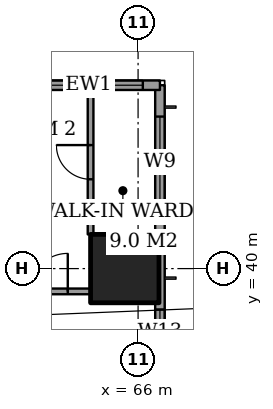
"""IFC4 building model, lengths in metres.
Left out: names, types, materials, properties, quantities, classifications, styles, units other than length and angle.
Written with IfcOpenShell. Run it as: python <this file> out.ifc"""

import sys

from ifc_helpers import new_model, si_unit, direction, frame, frame_2d, origin, origin_2d, place, context, subcontext, project, spatial, rectangle, extrude, element, fill, save


model = new_model("IFC4")
c1 = context("Model", 3, precision=1e-05, world=origin(), true_north=direction((0.0, 1.0)))
c2 = subcontext(c1, "Body", "Model", "MODEL_VIEW")
j1 = project(units=[si_unit("LENGTHUNIT", "METRE"), si_unit("PLANEANGLEUNIT", "RADIAN")], contexts=[c1])
p1 = place(None, origin())
s1 = spatial("IfcSite", under=j1, at=p1, CompositionType="ELEMENT")
p2 = place(p1, origin())
s2 = spatial("IfcBuilding", under=s1, at=p2, CompositionType="ELEMENT")
p3 = place(p2, frame((0.0, 0.0, 193.0)))
s3 = spatial("IfcBuildingStorey", under=s2, at=p3, CompositionType="ELEMENT", Elevation=193.0)
p4 = place(p3, frame((65.65, 40.0, 0.0), z_axis=(0.0, 0.0, 1.0), x_axis=(1.0, 0.0, 0.0)))
e1 = element("IfcColumn", 1, at=p4, inside=s3, PredefinedType="COLUMN", context=c2, shape_type="SweptSolid", body=[
    extrude(rectangle(XDim=1.8, YDim=1.8, at=origin_2d()), origin(), (0.0, 0.0, 1.0), 3.6),
])
p5 = place(p3, frame((66.575, 3.175, 0.0), z_axis=(0.0, 0.0, 1.0), x_axis=(0.0, 1.0, 0.0)))
e2 = element("IfcWall", 2, at=p5, inside=s3, PredefinedType="SOLIDWALL", context=c2, shape_type="SweptSolid", body=[
    extrude(rectangle(XDim=41.65, YDim=0.25, at=frame_2d((20.825, 0.0))), origin(), (0.0, 0.0, 1.0), 3.6),
])
p6 = place(p5, frame((0.825, 0.0, 0.2)))
e3 = element("IfcOpeningElement", 3, at=p6, cuts=e2, PredefinedType="OPENING", context=c2, shape_type="SweptSolid", body=[
    extrude(rectangle(XDim=2.4, YDim=2.4, at=frame_2d((1.2, 1.2))), frame((0.0, 0.135, 0.0), z_axis=(0.0, -1.0, 0.0), x_axis=(1.0, 0.0, 0.0)), (0.0, 0.0, 1.0), 0.27),
])
p7 = place(p5, frame((6.05, 0.0, 0.2)))
e4 = element("IfcOpeningElement", 4, at=p7, cuts=e2, PredefinedType="OPENING", context=c2, shape_type="SweptSolid", body=[
    extrude(rectangle(XDim=1.2, YDim=2.4, at=frame_2d((0.6, 1.2))), frame((0.0, 0.135, 0.0), z_axis=(0.0, -1.0, 0.0), x_axis=(1.0, 0.0, 0.0)), (0.0, 0.0, 1.0), 0.27),
])
p8 = place(p5, frame((8.475, 0.0, 0.2)))
e5 = element("IfcOpeningElement", 5, at=p8, cuts=e2, PredefinedType="OPENING", context=c2, shape_type="SweptSolid", body=[
    extrude(rectangle(XDim=2.4, YDim=2.4, at=frame_2d((1.2, 1.2))), frame((0.0, 0.135, 0.0), z_axis=(0.0, -1.0, 0.0), x_axis=(1.0, 0.0, 0.0)), (0.0, 0.0, 1.0), 0.27),
])
p9 = place(p5, frame((15.675, 0.0, 0.2)))
e6 = element("IfcOpeningElement", 6, at=p9, cuts=e2, PredefinedType="OPENING", context=c2, shape_type="SweptSolid", body=[
    extrude(rectangle(XDim=2.4, YDim=2.4, at=frame_2d((1.2, 1.2))), frame((0.0, 0.135, 0.0), z_axis=(0.0, -1.0, 0.0), x_axis=(1.0, 0.0, 0.0)), (0.0, 0.0, 1.0), 0.27),
])
p10 = place(p5, frame((23.625, 0.0, 0.2)))
e7 = element("IfcOpeningElement", 7, at=p10, cuts=e2, PredefinedType="OPENING", context=c2, shape_type="SweptSolid", body=[
    extrude(rectangle(XDim=2.4, YDim=2.4, at=frame_2d((1.2, 1.2))), frame((0.0, 0.135, 0.0), z_axis=(0.0, -1.0, 0.0), x_axis=(1.0, 0.0, 0.0)), (0.0, 0.0, 1.0), 0.27),
])
p11 = place(p5, frame((30.775, 0.0, 0.2)))
e8 = element("IfcOpeningElement", 8, at=p11, cuts=e2, PredefinedType="OPENING", context=c2, shape_type="SweptSolid", body=[
    extrude(rectangle(XDim=2.4, YDim=2.4, at=frame_2d((1.2, 1.2))), frame((0.0, 0.135, 0.0), z_axis=(0.0, -1.0, 0.0), x_axis=(1.0, 0.0, 0.0)), (0.0, 0.0, 1.0), 0.27),
])
p12 = place(p5, frame((34.55, 0.0, 0.2)))
e9 = element("IfcOpeningElement", 9, at=p12, cuts=e2, PredefinedType="OPENING", context=c2, shape_type="SweptSolid", body=[
    extrude(rectangle(XDim=1.2, YDim=2.4, at=frame_2d((0.6, 1.2))), frame((0.0, 0.135, 0.0), z_axis=(0.0, -1.0, 0.0), x_axis=(1.0, 0.0, 0.0)), (0.0, 0.0, 1.0), 0.27),
])
p13 = place(p5, frame((38.425, 0.0, 0.2)))
e10 = element("IfcOpeningElement", 10, at=p13, cuts=e2, PredefinedType="OPENING", context=c2, shape_type="SweptSolid", body=[
    extrude(rectangle(XDim=2.4, YDim=2.4, at=frame_2d((1.2, 1.2))), frame((0.0, 0.135, 0.0), z_axis=(0.0, -1.0, 0.0), x_axis=(1.0, 0.0, 0.0)), (0.0, 0.0, 1.0), 0.27),
])
p14 = place(p3, frame((66.575, 44.825, 0.0), z_axis=(0.0, 0.0, 1.0), x_axis=(-1.0, 0.0, 0.0)))
e11 = element("IfcWall", 11, at=p14, inside=s3, PredefinedType="SOLIDWALL", context=c2, shape_type="SweptSolid", body=[
    extrude(rectangle(XDim=3.75, YDim=0.25, at=frame_2d((1.875, 0.0))), origin(), (0.0, 0.0, 1.0), 3.6),
])
p15 = place(p14, frame((0.45, 0.0, 0.2)))
e12 = element("IfcOpeningElement", 12, at=p15, cuts=e11, PredefinedType="OPENING", context=c2, shape_type="SweptSolid", body=[
    extrude(rectangle(XDim=1.2, YDim=2.4, at=frame_2d((0.6, 1.2))), frame((0.0, 0.135, 0.0), z_axis=(0.0, -1.0, 0.0), x_axis=(1.0, 0.0, 0.0)), (0.0, 0.0, 1.0), 0.27),
])
p16 = place(p14, frame((2.188, 0.0, 0.2)))
e13 = element("IfcOpeningElement", 13, at=p16, cuts=e11, PredefinedType="OPENING", context=c2, shape_type="SweptSolid", body=[
    extrude(rectangle(XDim=1.2, YDim=2.4, at=frame_2d((0.6, 1.2))), frame((0.0, 0.135, 0.0), z_axis=(0.0, -1.0, 0.0), x_axis=(1.0, 0.0, 0.0)), (0.0, 0.0, 1.0), 0.27),
])
p17 = place(p3, frame((58.9, 39.4, 0.0), z_axis=(0.0, 0.0, 1.0), x_axis=(1.0, 0.0, 0.0)))
e14 = element("IfcWall", 14, at=p17, inside=s3, PredefinedType="PARTITIONING", context=c2, shape_type="SweptSolid", body=[
    extrude(rectangle(XDim=5.85, YDim=0.15, at=frame_2d((2.925, 0.0))), origin(), (0.0, 0.0, 1.0), 3.35),
])
p18 = place(p17, frame((4.25, 0.0, 0.0)))
e15 = element("IfcOpeningElement", 15, at=p18, cuts=e14, PredefinedType="OPENING", context=c2, shape_type="SweptSolid", body=[
    extrude(rectangle(XDim=1.0, YDim=2.1, at=frame_2d((0.5, 1.05))), frame((0.0, 0.085, 0.0), z_axis=(0.0, -1.0, 0.0), x_axis=(1.0, 0.0, 0.0)), (0.0, 0.0, 1.0), 0.17),
])
p19 = place(p17, frame((0.425, 0.0, 0.0)))
e16 = element("IfcOpeningElement", 16, at=p19, cuts=e14, PredefinedType="OPENING", context=c2, shape_type="SweptSolid", body=[
    extrude(rectangle(XDim=1.0, YDim=2.1, at=frame_2d((0.5, 1.05))), frame((0.0, 0.085, 0.0), z_axis=(0.0, -1.0, 0.0), x_axis=(1.0, 0.0, 0.0)), (0.0, 0.0, 1.0), 0.17),
])
p20 = place(p3, frame((64.75, 40.9, 0.0), z_axis=(0.0, 0.0, 1.0), x_axis=(0.0, 1.0, 0.0)))
e17 = element("IfcWall", 17, at=p20, inside=s3, PredefinedType="PARTITIONING", context=c2, shape_type="SweptSolid", body=[
    extrude(rectangle(XDim=3.8, YDim=0.15, at=frame_2d((1.9, 0.0))), origin(), (0.0, 0.0, 1.0), 3.35),
])
p21 = place(p20, frame((1.45, 0.0, 0.0)))
e18 = element("IfcOpeningElement", 18, at=p21, cuts=e17, PredefinedType="OPENING", context=c2, shape_type="SweptSolid", body=[
    extrude(rectangle(XDim=0.9, YDim=2.1, at=frame_2d((0.45, 1.05))), frame((0.0, 0.085, 0.0), z_axis=(0.0, -1.0, 0.0), x_axis=(1.0, 0.0, 0.0)), (0.0, 0.0, 1.0), 0.17),
])
p22 = place(p12, origin())
e19 = element("IfcWindow", 19, at=p22, inside=s3, PartitioningType="SINGLE_PANEL", PredefinedType="WINDOW", context=c2, shape_type="SweptSolid", body=[
    extrude(rectangle(XDim=1.2, YDim=2.4, at=frame_2d((0.6, 1.2))), frame((0.0, 0.03, 0.0), z_axis=(0.0, -1.0, 0.0), x_axis=(1.0, 0.0, 0.0)), (0.0, 0.0, 1.0), 0.06),
])
fill(e9, e19)
p23 = place(p13, origin())
e20 = element("IfcWindow", 20, at=p23, inside=s3, PartitioningType="SINGLE_PANEL", PredefinedType="WINDOW", context=c2, shape_type="SweptSolid", body=[
    extrude(rectangle(XDim=2.4, YDim=2.4, at=frame_2d((1.2, 1.2))), frame((0.0, 0.03, 0.0), z_axis=(0.0, -1.0, 0.0), x_axis=(1.0, 0.0, 0.0)), (0.0, 0.0, 1.0), 0.06),
])
fill(e10, e20)
p24 = place(p15, origin())
e21 = element("IfcWindow", 21, at=p24, inside=s3, PartitioningType="SINGLE_PANEL", PredefinedType="WINDOW", context=c2, shape_type="SweptSolid", body=[
    extrude(rectangle(XDim=1.2, YDim=2.4, at=frame_2d((0.6, 1.2))), frame((0.0, 0.03, 0.0), z_axis=(0.0, -1.0, 0.0), x_axis=(1.0, 0.0, 0.0)), (0.0, 0.0, 1.0), 0.06),
])
fill(e12, e21)
p25 = place(p16, origin())
e22 = element("IfcWindow", 22, at=p25, inside=s3, PartitioningType="SINGLE_PANEL", PredefinedType="WINDOW", context=c2, shape_type="SweptSolid", body=[
    extrude(rectangle(XDim=1.2, YDim=2.4, at=frame_2d((0.6, 1.2))), frame((0.0, 0.03, 0.0), z_axis=(0.0, -1.0, 0.0), x_axis=(1.0, 0.0, 0.0)), (0.0, 0.0, 1.0), 0.06),
])
fill(e13, e22)
p26 = place(p21, origin())
e23 = element("IfcDoor", 23, at=p26, inside=s3, OperationType="SINGLE_SWING_LEFT", PredefinedType="DOOR", context=c2, shape_type="SweptSolid", body=[
    extrude(rectangle(XDim=0.9, YDim=2.1, at=frame_2d((0.45, 1.05))), frame((0.0, 0.025, 0.0), z_axis=(0.0, -1.0, 0.0), x_axis=(1.0, 0.0, 0.0)), (0.0, 0.0, 1.0), 0.05),
])
fill(e18, e23)
p27 = place(p18, origin())
e24 = element("IfcDoor", 24, at=p27, inside=s3, OperationType="SINGLE_SWING_LEFT", PredefinedType="DOOR", context=c2, shape_type="SweptSolid", body=[
    extrude(rectangle(XDim=1.0, YDim=2.1, at=frame_2d((0.5, 1.05))), frame((0.0, 0.025, 0.0), z_axis=(0.0, -1.0, 0.0), x_axis=(1.0, 0.0, 0.0)), (0.0, 0.0, 1.0), 0.05),
])
fill(e15, e24)
save(model, sys.argv[1])
